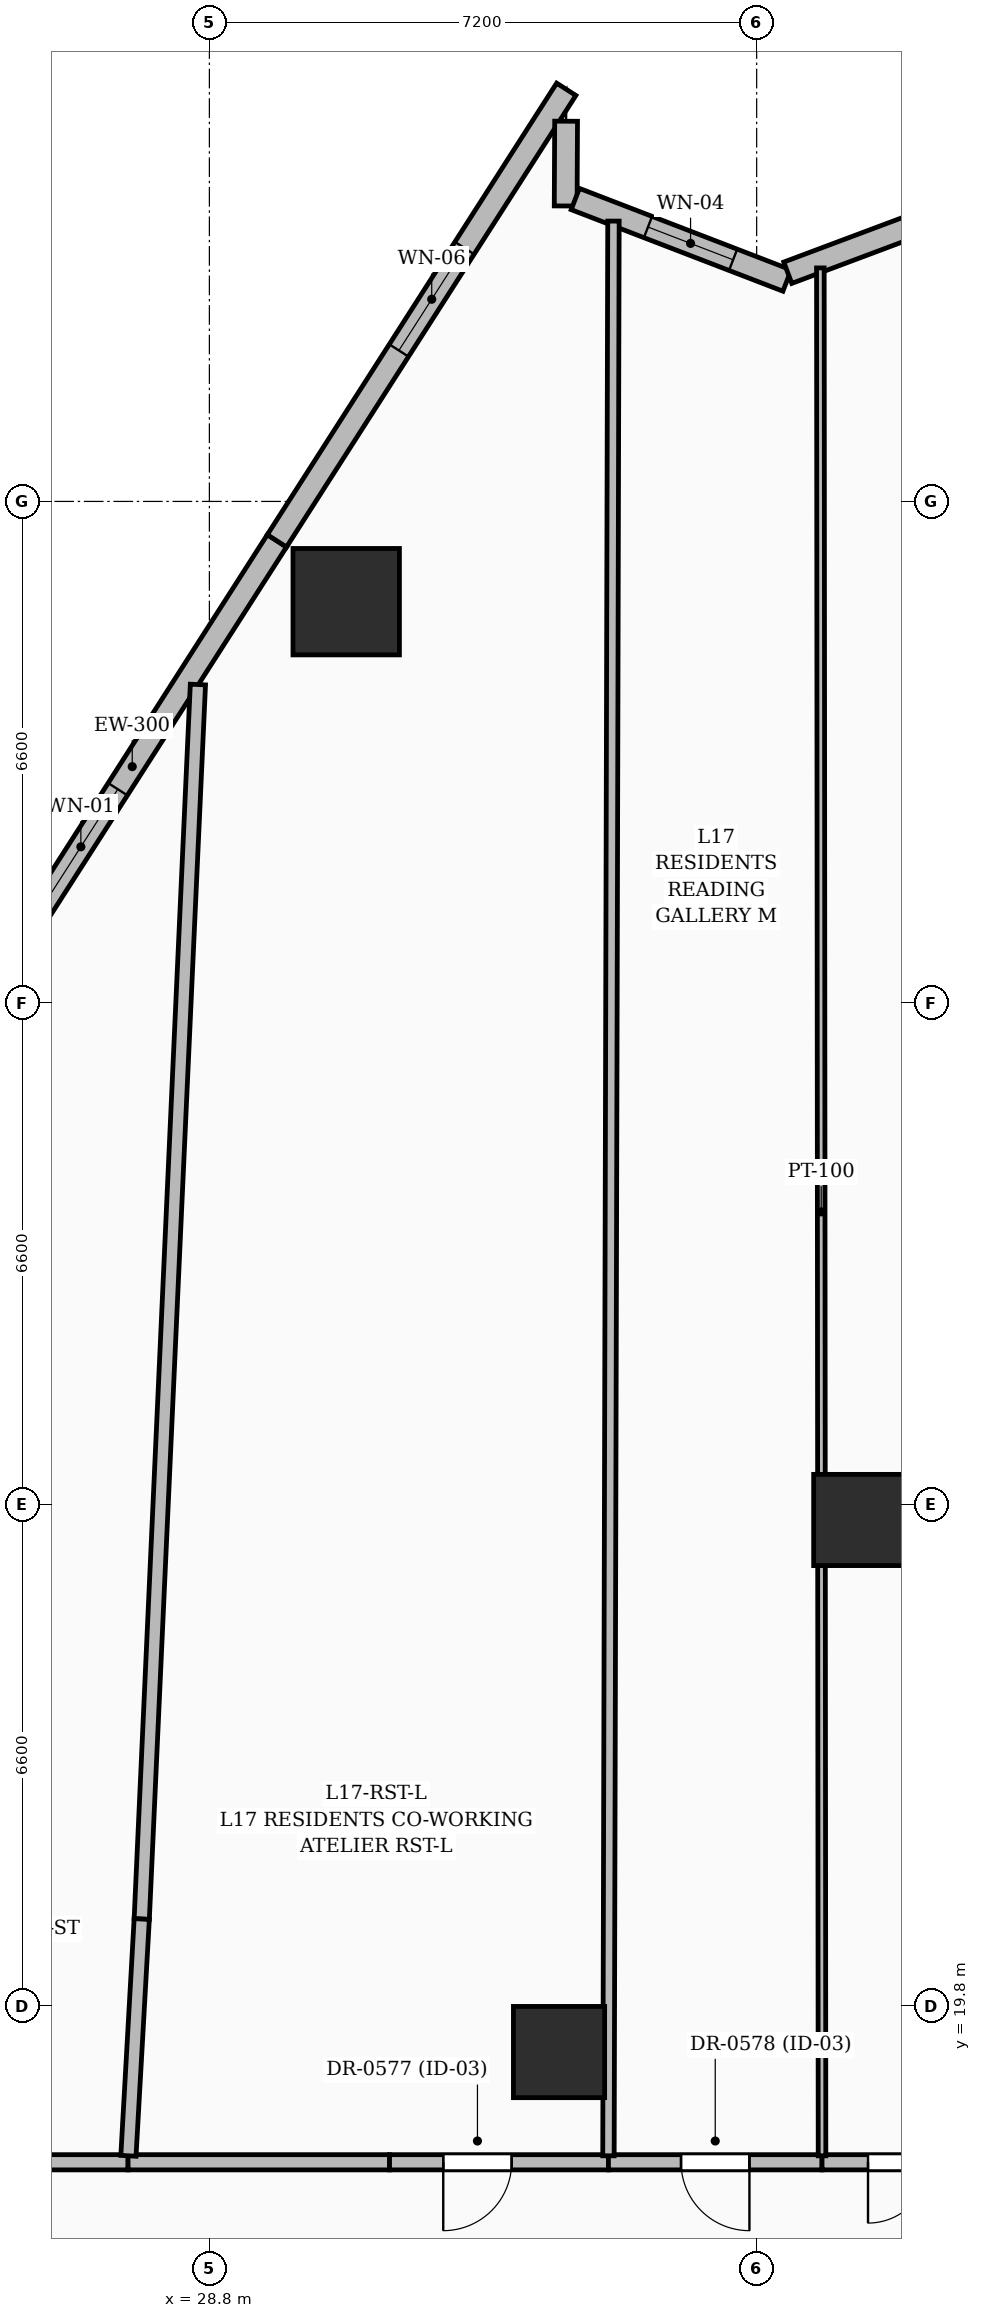
"""IFC4 building model, lengths in metres.
Left out: names, types, materials, properties, quantities, classifications, styles, units other than length and angle.
Written with IfcOpenShell. Run it as: python <this file> out.ifc"""

import sys

from ifc_helpers import new_model, si_unit, direction, frame, frame_2d, origin, origin_2d, place, context, subcontext, project, spatial, rectangle, extrude, element, fill, save


model = new_model("IFC4")
c1 = context("Model", 3, precision=1e-05, world=origin(), true_north=direction((0.0, 1.0)))
c2 = subcontext(c1, "Body", "Model", "MODEL_VIEW")
j1 = project(units=[si_unit("LENGTHUNIT", "METRE"), si_unit("PLANEANGLEUNIT", "RADIAN")], contexts=[c1])
p1 = place(None, origin())
s1 = spatial("IfcSite", under=j1, at=p1, CompositionType="ELEMENT")
p2 = place(p1, origin())
s2 = spatial("IfcBuilding", under=s1, at=p2, CompositionType="ELEMENT")
p3 = place(p2, frame((0.0, 0.0, 71.4)))
s3 = spatial("IfcBuildingStorey", under=s2, at=p3, CompositionType="ELEMENT", Elevation=71.4)
for number, where, z_axis, x_axis in (
    (1, (37.35, 26.2, 0.0), (0.0, 0.0, 1.0), (1.0, 0.0, 0.0)),
    (2, (33.4, 19.2, 0.0), (0.0, 0.0, 1.0), (1.0, 0.0, 0.0)),
):
    element("IfcColumn", number, at=place(p3, frame(where, z_axis=z_axis, x_axis=x_axis)), inside=s3, PredefinedType="COLUMN", context=c2, shape_type="SweptSolid", body=[
        extrude(rectangle(XDim=1.2, YDim=1.2, at=origin_2d()), origin(), (0.0, 0.0, 1.0), 3.6),
    ])
p4 = place(p3, frame((30.6, 38.281, 0.0), z_axis=(0.0, 0.0, 1.0), x_axis=(1.0, 0.0, 0.0)))
e3 = element("IfcColumn", 3, at=p4, inside=s3, PredefinedType="COLUMN", context=c2, shape_type="SweptSolid", body=[
    extrude(rectangle(XDim=1.4, YDim=1.4, at=origin_2d()), origin(), (0.0, 0.0, 1.0), 3.6),
])
p5 = place(p3, frame((25.882, 33.141, 0.0), z_axis=(0.0, 0.0, 1.0), x_axis=(0.539517071838, 0.841974660661, 0.0)))
e4 = element("IfcWall", 4, at=p5, inside=s3, PredefinedType="SOLIDWALL", context=c2, shape_type="SweptSolid", body=[
    extrude(rectangle(XDim=7.056, YDim=0.3, at=frame_2d((3.528, 0.0))), origin(), (0.0, 0.0, 1.0), 3.35),
])
p6 = place(p5, frame((1.375, 0.0, 0.6)))
e5 = element("IfcOpeningElement", 5, at=p6, cuts=e4, PredefinedType="OPENING", context=c2, shape_type="SweptSolid", body=[
    extrude(rectangle(XDim=1.8, YDim=2.1, at=frame_2d((0.9, 1.05))), frame((0.0, 0.16, 0.0), z_axis=(0.0, -1.0, 0.0), x_axis=(1.0, 0.0, 0.0)), (0.0, 0.0, 1.0), 0.32),
])
p7 = place(p3, frame((29.688, 39.081, 0.0), z_axis=(0.0, 0.0, 1.0), x_axis=(0.539541601369, 0.841958942225, 0.0)))
e6 = element("IfcWall", 6, at=p7, inside=s3, PredefinedType="SOLIDWALL", context=c2, shape_type="SweptSolid", body=[
    extrude(rectangle(XDim=7.056, YDim=0.3, at=frame_2d((3.528, 0.0))), origin(), (0.0, 0.0, 1.0), 3.35),
])
p8 = place(p7, frame((2.975, 0.0, 0.55)))
e7 = element("IfcOpeningElement", 7, at=p8, cuts=e6, PredefinedType="OPENING", context=c2, shape_type="SweptSolid", body=[
    extrude(rectangle(XDim=1.6, YDim=2.2, at=frame_2d((0.8, 1.1))), frame((0.0, 0.16, 0.0), z_axis=(0.0, -1.0, 0.0), x_axis=(1.0, 0.0, 0.0)), (0.0, 0.0, 1.0), 0.32),
])
p9 = place(p3, frame((33.493, 44.602, 0.0), z_axis=(0.0, 0.0, 1.0), x_axis=(-0.005036064886, -0.999987318945, 0.0)))
e8 = element("IfcWall", 8, at=p9, inside=s3, PredefinedType="SOLIDWALL", context=c2, shape_type="SweptSolid", body=[
    extrude(rectangle(XDim=1.115, YDim=0.3, at=frame_2d((0.558, 0.0))), origin(), (0.0, 0.0, 1.0), 3.35),
])
p10 = place(p3, frame((33.614, 43.579, 0.0), z_axis=(0.0, 0.0, 1.0), x_axis=(0.933166321884, -0.359444871576, 0.0)))
e9 = element("IfcWall", 9, at=p10, inside=s3, PredefinedType="SOLIDWALL", context=c2, shape_type="SweptSolid", body=[
    extrude(rectangle(XDim=2.985, YDim=0.3, at=frame_2d((1.493, 0.0))), origin(), (0.0, 0.0, 1.0), 3.35),
])
p11 = place(p10, frame((1.025, 0.0, 0.8)))
e10 = element("IfcOpeningElement", 10, at=p11, cuts=e9, PredefinedType="OPENING", context=c2, shape_type="SweptSolid", body=[
    extrude(rectangle(XDim=1.2, YDim=1.8, at=frame_2d((0.6, 0.9))), frame((0.0, 0.16, 0.0), z_axis=(0.0, -1.0, 0.0), x_axis=(1.0, 0.0, 0.0)), (0.0, 0.0, 1.0), 0.32),
])
p12 = place(p3, frame((36.409, 42.609, 0.0), z_axis=(0.0, 0.0, 1.0), x_axis=(0.936403459864, 0.350925291699, 0.0)))
e11 = element("IfcWall", 11, at=p12, inside=s3, PredefinedType="SOLIDWALL", context=c2, shape_type="SweptSolid", body=[
    extrude(rectangle(XDim=2.971, YDim=0.3, at=frame_2d((1.485, 0.0))), origin(), (0.0, 0.0, 1.0), 3.35),
])
p13 = place(p3, frame((27.73, 17.75, 0.0), z_axis=(0.0, 0.0, 1.0), x_axis=(-1.0, 0.0, 0.0)))
e12 = element("IfcWall", 12, at=p13, inside=s3, PredefinedType="PARTITIONING", context=c2, shape_type="SweptSolid", body=[
    extrude(rectangle(XDim=6.245, YDim=0.2, at=frame_2d((3.123, 0.0))), origin(), (0.0, 0.0, 1.0), 1.12),
])
p14 = place(p3, frame((31.17, 17.75, 0.0), z_axis=(0.0, 0.0, 1.0), x_axis=(-1.0, 0.0, 0.0)))
e13 = element("IfcWall", 13, at=p14, inside=s3, PredefinedType="PARTITIONING", context=c2, shape_type="SweptSolid", body=[
    extrude(rectangle(XDim=3.44, YDim=0.2, at=frame_2d((1.72, 0.0))), origin(), (0.0, 0.0, 1.0), 3.35),
])
p15 = place(p3, frame((34.05, 17.75, 0.0), z_axis=(0.0, 0.0, 1.0), x_axis=(-1.0, 0.0, 0.0)))
e14 = element("IfcWall", 14, at=p15, inside=s3, PredefinedType="PARTITIONING", context=c2, shape_type="SweptSolid", body=[
    extrude(rectangle(XDim=2.88, YDim=0.2, at=frame_2d((1.44, 0.0))), origin(), (0.0, 0.0, 1.0), 2.309),
])
p16 = place(p15, frame((1.273, 0.0, 0.0)))
e15 = element("IfcOpeningElement", 15, at=p16, cuts=e14, PredefinedType="OPENING", context=c2, shape_type="SweptSolid", body=[
    extrude(rectangle(XDim=0.9, YDim=2.1, at=frame_2d((0.45, 1.05))), frame((0.0, 0.11, 0.0), z_axis=(0.0, -1.0, 0.0), x_axis=(1.0, 0.0, 0.0)), (0.0, 0.0, 1.0), 0.22),
])
p17 = place(p3, frame((36.86, 17.75, 0.0), z_axis=(0.0, 0.0, 1.0), x_axis=(-1.0, 0.0, 0.0)))
e16 = element("IfcWall", 16, at=p17, inside=s3, PredefinedType="PARTITIONING", context=c2, shape_type="SweptSolid", body=[
    extrude(rectangle(XDim=2.81, YDim=0.2, at=frame_2d((1.405, 0.0))), origin(), (0.0, 0.0, 1.0), 2.309),
])
p18 = place(p17, frame((0.955, 0.0, 0.0)))
e17 = element("IfcOpeningElement", 17, at=p18, cuts=e16, PredefinedType="OPENING", context=c2, shape_type="SweptSolid", body=[
    extrude(rectangle(XDim=0.9, YDim=2.1, at=frame_2d((0.45, 1.05))), frame((0.0, 0.11, 0.0), z_axis=(0.0, -1.0, 0.0), x_axis=(1.0, 0.0, 0.0)), (0.0, 0.0, 1.0), 0.22),
])
p19 = place(p3, frame((39.67, 17.75, 0.0), z_axis=(0.0, 0.0, 1.0), x_axis=(-1.0, 0.0, 0.0)))
e18 = element("IfcWall", 18, at=p19, inside=s3, PredefinedType="PARTITIONING", context=c2, shape_type="SweptSolid", body=[
    extrude(rectangle(XDim=2.81, YDim=0.2, at=frame_2d((1.405, 0.0))), origin(), (0.0, 0.0, 1.0), 3.35),
])
p20 = place(p19, frame((0.605, 0.0, 0.0)))
e19 = element("IfcOpeningElement", 19, at=p20, cuts=e18, PredefinedType="OPENING", context=c2, shape_type="SweptSolid", body=[
    extrude(rectangle(XDim=1.6, YDim=2.3, at=frame_2d((0.8, 1.15))), frame((0.0, 0.11, 0.0), z_axis=(0.0, -1.0, 0.0), x_axis=(1.0, 0.0, 0.0)), (0.0, 0.0, 1.0), 0.22),
])
p21 = place(p3, frame((27.91, 20.95, 0.0), z_axis=(0.0, 0.0, 1.0), x_axis=(0.045456024432, 0.998966340696, 0.0)))
e20 = element("IfcWall", 20, at=p21, inside=s3, PredefinedType="PARTITIONING", context=c2, shape_type="SweptSolid", body=[
    extrude(rectangle(XDim=16.258, YDim=0.2, at=frame_2d((8.129, 0.0))), origin(), (0.0, 0.0, 1.0), 1.12),
])
p22 = place(p3, frame((27.735, 17.835, 0.0), z_axis=(0.0, 0.0, 1.0), x_axis=(0.056107104776, 0.9984247557, 0.0)))
e21 = element("IfcWall", 21, at=p22, inside=s3, PredefinedType="PARTITIONING", context=c2, shape_type="SweptSolid", body=[
    extrude(rectangle(XDim=3.12, YDim=0.2, at=frame_2d((1.56, 0.0))), origin(), (0.0, 0.0, 1.0), 2.86),
])
p23 = place(p3, frame((34.05, 17.835, 0.0), z_axis=(0.0, 0.0, 1.0), x_axis=(0.002580178643, 0.999996671334, 0.0)))
e22 = element("IfcWall", 22, at=p23, inside=s3, PredefinedType="PARTITIONING", context=c2, shape_type="SweptSolid", body=[
    extrude(rectangle(XDim=25.453, YDim=0.15, at=frame_2d((12.727, 0.0))), origin(), (0.0, 0.0, 1.0), 1.12),
])
p24 = place(p3, frame((36.86, 17.835, 0.0), z_axis=(0.0, 0.0, 1.0), x_axis=(-0.000894497986, 0.999999599937, 0.0)))
e23 = element("IfcWall", 23, at=p24, inside=s3, PredefinedType="PARTITIONING", context=c2, shape_type="SweptSolid", body=[
    extrude(rectangle(XDim=24.837, YDim=0.1, at=frame_2d((12.418, 0.0))), origin(), (0.0, 0.0, 1.0), 1.12),
])
p25 = place(p6, origin())
e24 = element("IfcWindow", 24, at=p25, inside=s3, PartitioningType="SINGLE_PANEL", PredefinedType="WINDOW", context=c2, shape_type="SweptSolid", body=[
    extrude(rectangle(XDim=1.8, YDim=2.1, at=frame_2d((0.9, 1.05))), frame((0.0, 0.03, 0.0), z_axis=(0.0, -1.0, 0.0), x_axis=(1.0, 0.0, 0.0)), (0.0, 0.0, 1.0), 0.06),
])
fill(e5, e24)
p26 = place(p8, origin())
e25 = element("IfcWindow", 25, at=p26, inside=s3, PartitioningType="SINGLE_PANEL", PredefinedType="WINDOW", context=c2, shape_type="SweptSolid", body=[
    extrude(rectangle(XDim=1.6, YDim=2.2, at=frame_2d((0.8, 1.1))), frame((0.0, 0.03, 0.0), z_axis=(0.0, -1.0, 0.0), x_axis=(1.0, 0.0, 0.0)), (0.0, 0.0, 1.0), 0.06),
])
fill(e7, e25)
p27 = place(p11, origin())
e26 = element("IfcWindow", 26, at=p27, inside=s3, PartitioningType="SINGLE_PANEL", PredefinedType="WINDOW", context=c2, shape_type="SweptSolid", body=[
    extrude(rectangle(XDim=1.2, YDim=1.8, at=frame_2d((0.6, 0.9))), frame((0.0, 0.03, 0.0), z_axis=(0.0, -1.0, 0.0), x_axis=(1.0, 0.0, 0.0)), (0.0, 0.0, 1.0), 0.06),
])
fill(e10, e26)
p28 = place(p16, origin())
e27 = element("IfcDoor", 27, at=p28, inside=s3, OperationType="SINGLE_SWING_RIGHT", PredefinedType="DOOR", context=c2, shape_type="SweptSolid", body=[
    extrude(rectangle(XDim=0.9, YDim=2.1, at=frame_2d((0.45, 1.05))), frame((0.0, 0.025, 0.0), z_axis=(0.0, -1.0, 0.0), x_axis=(1.0, 0.0, 0.0)), (0.0, 0.0, 1.0), 0.05),
])
fill(e15, e27)
p29 = place(p18, origin())
e28 = element("IfcDoor", 28, at=p29, inside=s3, OperationType="SINGLE_SWING_LEFT", PredefinedType="DOOR", context=c2, shape_type="SweptSolid", body=[
    extrude(rectangle(XDim=0.9, YDim=2.1, at=frame_2d((0.45, 1.05))), frame((0.0, 0.025, 0.0), z_axis=(0.0, -1.0, 0.0), x_axis=(1.0, 0.0, 0.0)), (0.0, 0.0, 1.0), 0.05),
])
fill(e17, e28)
p30 = place(p20, origin())
e29 = element("IfcDoor", 29, at=p30, inside=s3, OperationType="DOUBLE_DOOR_SINGLE_SWING", PredefinedType="DOOR", context=c2, shape_type="SweptSolid", body=[
    extrude(rectangle(XDim=1.6, YDim=2.3, at=frame_2d((0.8, 1.15))), frame((0.0, 0.025, 0.0), z_axis=(0.0, -1.0, 0.0), x_axis=(1.0, 0.0, 0.0)), (0.0, 0.0, 1.0), 0.05),
])
fill(e19, e29)
save(model, sys.argv[1])
